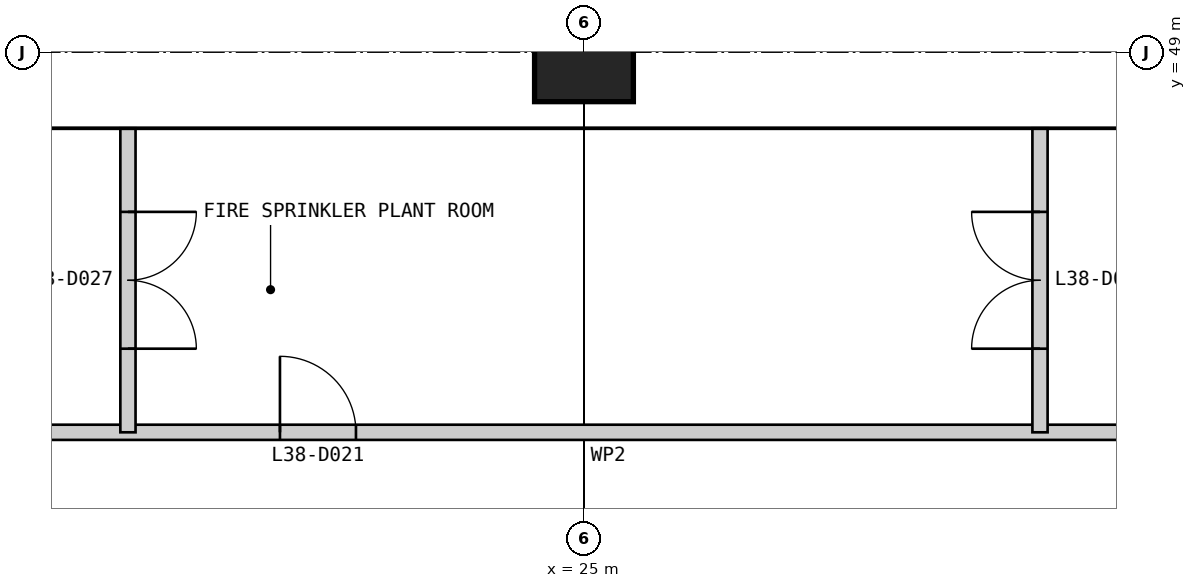
"""IFC4 building model, lengths in metres.
Left out: names, types, materials, properties, quantities, classifications, styles, units other than length and angle.
Written with IfcOpenShell. Run it as: python <this file> out.ifc"""

import sys

from ifc_helpers import new_model, si_unit, direction, frame, frame_2d, origin, origin_2d, place, context, subcontext, project, spatial, rectangle, extrude, element, fill, save


model = new_model("IFC4")
c1 = context("Model", 3, precision=1e-05, world=origin(), true_north=direction((0.0, 1.0)))
c2 = subcontext(c1, "Body", "Model", "MODEL_VIEW")
j1 = project(units=[si_unit("LENGTHUNIT", "METRE"), si_unit("PLANEANGLEUNIT", "RADIAN")], contexts=[c1])
p1 = place(None, origin())
s1 = spatial("IfcSite", under=j1, at=p1, CompositionType="ELEMENT")
p2 = place(p1, origin())
s2 = spatial("IfcBuilding", under=s1, at=p2, CompositionType="ELEMENT")
p3 = place(p2, frame((0.0, 0.0, 162.4)))
s3 = spatial("IfcBuildingStorey", under=s2, at=p3, CompositionType="ELEMENT", Elevation=162.4)
p4 = place(p3, frame((25.0, 49.0, 0.0), z_axis=(0.0, 0.0, 1.0), x_axis=(1.0, 0.0, 0.0)))
e1 = element("IfcColumn", 1, at=p4, inside=s3, PredefinedType="COLUMN", context=c2, shape_type="SweptSolid", body=[
    extrude(rectangle(XDim=1.3, YDim=1.3, at=origin_2d()), origin(), (0.0, 0.0, 1.0), 6.0),
])
p5 = place(p3, frame((13.0, 44.0, 0.0), z_axis=(0.0, 0.0, 1.0), x_axis=(1.0, 0.0, 0.0)))
e2 = element("IfcWall", 2, at=p5, inside=s3, PredefinedType="PARTITIONING", context=c2, shape_type="SweptSolid", body=[
    extrude(rectangle(XDim=24.0, YDim=0.2, at=frame_2d((12.0, 0.0))), origin(), (0.0, 0.0, 1.0), 5.8),
])
p6 = place(p5, frame((8.0, 0.0, 0.0)))
e3 = element("IfcOpeningElement", 3, at=p6, cuts=e2, PredefinedType="OPENING", context=c2, shape_type="SweptSolid", body=[
    extrude(rectangle(XDim=1.0, YDim=2.2, at=frame_2d((0.5, 1.1))), frame((0.0, 0.11, 0.0), z_axis=(0.0, -1.0, 0.0), x_axis=(1.0, 0.0, 0.0)), (0.0, 0.0, 1.0), 0.22),
])
p7 = place(p3, frame((19.0, 44.0, 0.0), z_axis=(0.0, 0.0, 1.0), x_axis=(0.0, 1.0, 0.0)))
e4 = element("IfcWall", 4, at=p7, inside=s3, PredefinedType="PARTITIONING", context=c2, shape_type="SweptSolid", body=[
    extrude(rectangle(XDim=4.0, YDim=0.2, at=frame_2d((2.0, 0.0))), origin(), (0.0, 0.0, 1.0), 4.954),
])
p8 = place(p7, frame((1.1, 0.0, 0.0)))
e5 = element("IfcOpeningElement", 5, at=p8, cuts=e4, PredefinedType="OPENING", context=c2, shape_type="SweptSolid", body=[
    extrude(rectangle(XDim=1.8, YDim=2.4, at=frame_2d((0.9, 1.2))), frame((0.0, 0.11, 0.0), z_axis=(0.0, -1.0, 0.0), x_axis=(1.0, 0.0, 0.0)), (0.0, 0.0, 1.0), 0.22),
])
p9 = place(p3, frame((31.0, 44.0, 0.0), z_axis=(0.0, 0.0, 1.0), x_axis=(0.0, 1.0, 0.0)))
e6 = element("IfcWall", 6, at=p9, inside=s3, PredefinedType="PARTITIONING", context=c2, shape_type="SweptSolid", body=[
    extrude(rectangle(XDim=4.0, YDim=0.2, at=frame_2d((2.0, 0.0))), origin(), (0.0, 0.0, 1.0), 4.954),
])
p10 = place(p9, frame((1.1, 0.0, 0.0)))
e7 = element("IfcOpeningElement", 7, at=p10, cuts=e6, PredefinedType="OPENING", context=c2, shape_type="SweptSolid", body=[
    extrude(rectangle(XDim=1.8, YDim=2.4, at=frame_2d((0.9, 1.2))), frame((0.0, 0.11, 0.0), z_axis=(0.0, -1.0, 0.0), x_axis=(1.0, 0.0, 0.0)), (0.0, 0.0, 1.0), 0.22),
])
p11 = place(p6, origin())
e8 = element("IfcDoor", 8, at=p11, inside=s3, OperationType="SINGLE_SWING_LEFT", PredefinedType="DOOR", context=c2, shape_type="SweptSolid", body=[
    extrude(rectangle(XDim=1.0, YDim=2.2, at=frame_2d((0.5, 1.1))), frame((0.0, 0.025, 0.0), z_axis=(0.0, -1.0, 0.0), x_axis=(1.0, 0.0, 0.0)), (0.0, 0.0, 1.0), 0.05),
])
fill(e3, e8)
p12 = place(p8, frame((1.8, 0.0, 0.0), z_axis=(0.0, 0.0, 1.0), x_axis=(-1.0, 0.0, 0.0)))
e9 = element("IfcDoor", 9, at=p12, inside=s3, OperationType="DOUBLE_DOOR_SINGLE_SWING", PredefinedType="DOOR", context=c2, shape_type="SweptSolid", body=[
    extrude(rectangle(XDim=1.8, YDim=2.4, at=frame_2d((0.9, 1.2))), frame((0.0, 0.025, 0.0), z_axis=(0.0, -1.0, 0.0), x_axis=(1.0, 0.0, 0.0)), (0.0, 0.0, 1.0), 0.05),
])
fill(e5, e9)
p13 = place(p10, origin())
e10 = element("IfcDoor", 10, at=p13, inside=s3, OperationType="DOUBLE_DOOR_SINGLE_SWING", PredefinedType="DOOR", context=c2, shape_type="SweptSolid", body=[
    extrude(rectangle(XDim=1.8, YDim=2.4, at=frame_2d((0.9, 1.2))), frame((0.0, 0.025, 0.0), z_axis=(0.0, -1.0, 0.0), x_axis=(1.0, 0.0, 0.0)), (0.0, 0.0, 1.0), 0.05),
])
fill(e7, e10)
save(model, sys.argv[1])
